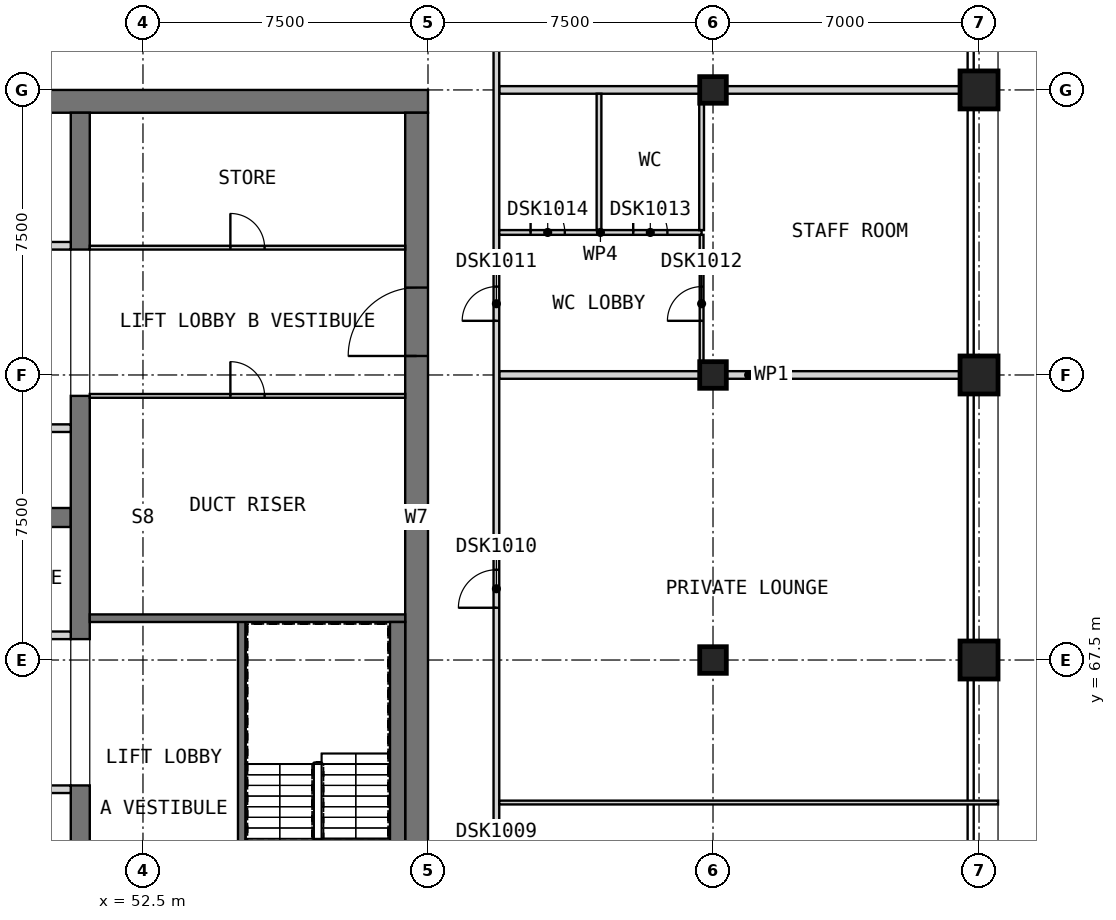
"""IFC4 building model, lengths in metres.
Left out: names, types, materials, properties, quantities, classifications, styles, units other than length and angle.
Written with IfcOpenShell. Run it as: python <this file> out.ifc"""

import sys

from ifc_helpers import new_model, si_unit, direction, frame, frame_2d, origin, origin_2d, place, context, subcontext, project, spatial, rectangle, extrude, element, fill, save


model = new_model("IFC4")
c1 = context("Model", 3, precision=1e-05, world=origin(), true_north=direction((0.0, 1.0)))
c2 = subcontext(c1, "Body", "Model", "MODEL_VIEW")
j1 = project(units=[si_unit("LENGTHUNIT", "METRE"), si_unit("PLANEANGLEUNIT", "RADIAN")], contexts=[c1])
p1 = place(None, origin())
s1 = spatial("IfcSite", under=j1, at=p1, CompositionType="ELEMENT")
p2 = place(p1, origin())
s2 = spatial("IfcBuilding", under=s1, at=p2, CompositionType="ELEMENT")
p3 = place(p2, frame((0.0, 0.0, 297.7)))
s3 = spatial("IfcBuildingStorey", under=s2, at=p3, CompositionType="ELEMENT", Elevation=297.7)
for number, where, z_axis, x_axis in (
    (1, (67.5, 67.5, 0.0), (0.0, 0.0, 1.0), (1.0, 0.0, 0.0)),
    (2, (67.5, 75.0, 0.0), (0.0, 0.0, 1.0), (1.0, 0.0, 0.0)),
    (3, (67.5, 82.5, 0.0), (0.0, 0.0, 1.0), (1.0, 0.0, 0.0)),
):
    element("IfcColumn", number, at=place(p3, frame(where, z_axis=z_axis, x_axis=x_axis)), inside=s3, PredefinedType="COLUMN", context=c2, shape_type="SweptSolid", body=[
        extrude(rectangle(XDim=0.7, YDim=0.7, at=origin_2d()), origin(), (0.0, 0.0, 1.0), 5.0),
    ])
for number, where, z_axis, x_axis in (
    (4, (74.5, 67.5, 0.0), (0.0, 0.0, 1.0), (1.0, 0.0, 0.0)),
    (5, (74.5, 75.0, 0.0), (0.0, 0.0, 1.0), (1.0, 0.0, 0.0)),
    (6, (74.5, 82.5, 0.0), (0.0, 0.0, 1.0), (1.0, 0.0, 0.0)),
):
    element("IfcColumn", number, at=place(p3, frame(where, z_axis=z_axis, x_axis=x_axis)), inside=s3, PredefinedType="COLUMN", context=c2, shape_type="SweptSolid", body=[
        extrude(rectangle(XDim=1.0, YDim=1.0, at=origin_2d()), origin(), (0.0, 0.0, 1.0), 5.0),
    ])
p4 = place(p3, frame((30.0, 82.2, 0.0), z_axis=(0.0, 0.0, 1.0), x_axis=(1.0, 0.0, 0.0)))
e7 = element("IfcWall", 7, at=p4, inside=s3, PredefinedType="SHEAR", context=c2, shape_type="SweptSolid", body=[
    extrude(rectangle(XDim=30.0, YDim=0.6, at=frame_2d((15.0, 0.0))), origin(), (0.0, 0.0, 1.0), 5.0),
])
p5 = place(p3, frame((59.7, 60.6, 0.0), z_axis=(0.0, 0.0, 1.0), x_axis=(0.0, 1.0, 0.0)))
e8 = element("IfcWall", 8, at=p5, inside=s3, PredefinedType="SHEAR", context=c2, shape_type="SweptSolid", body=[
    extrude(rectangle(XDim=21.3, YDim=0.6, at=frame_2d((10.65, 0.0))), origin(), (0.0, 0.0, 1.0), 5.0),
])
p6 = place(p5, frame((14.9, 0.0, 0.0)))
e9 = element("IfcOpeningElement", 9, at=p6, cuts=e8, PredefinedType="OPENING", context=c2, shape_type="SweptSolid", body=[
    extrude(rectangle(XDim=1.8, YDim=2.1, at=frame_2d((0.9, 1.05))), frame((0.0, 0.31, 0.0), z_axis=(0.0, -1.0, 0.0), x_axis=(1.0, 0.0, 0.0)), (0.0, 0.0, 1.0), 0.62),
])
p7 = place(p3, frame((35.0, 71.25, 0.0), z_axis=(0.0, 0.0, 1.0), x_axis=(1.0, 0.0, 0.0)))
e10 = element("IfcWall", 10, at=p7, inside=s3, PredefinedType="SHEAR", context=c2, shape_type="SweptSolid", body=[
    extrude(rectangle(XDim=15.6, YDim=0.5, at=frame_2d((7.8, 0.0))), origin(), (0.0, 0.0, 1.0), 5.0),
])
p8 = place(p3, frame((50.85, 60.6, 0.0), z_axis=(0.0, 0.0, 1.0), x_axis=(0.0, 1.0, 0.0)))
e11 = element("IfcWall", 11, at=p8, inside=s3, PredefinedType="SHEAR", context=c2, shape_type="SweptSolid", body=[
    extrude(rectangle(XDim=3.6, YDim=0.5, at=frame_2d((1.8, 0.0))), origin(), (0.0, 0.0, 1.0), 5.0),
])
p9 = place(p3, frame((50.85, 68.05, 0.0), z_axis=(0.0, 0.0, 1.0), x_axis=(0.0, 1.0, 0.0)))
e12 = element("IfcWall", 12, at=p9, inside=s3, PredefinedType="SHEAR", context=c2, shape_type="SweptSolid", body=[
    extrude(rectangle(XDim=6.4, YDim=0.5, at=frame_2d((3.2, 0.0))), origin(), (0.0, 0.0, 1.0), 5.0),
])
p10 = place(p3, frame((50.85, 78.3, 0.0), z_axis=(0.0, 0.0, 1.0), x_axis=(0.0, 1.0, 0.0)))
e13 = element("IfcWall", 13, at=p10, inside=s3, PredefinedType="SHEAR", context=c2, shape_type="SweptSolid", body=[
    extrude(rectangle(XDim=3.6, YDim=0.5, at=frame_2d((1.8, 0.0))), origin(), (0.0, 0.0, 1.0), 5.0),
])
p11 = place(p3, frame((35.0, 64.1, 0.0), z_axis=(0.0, 0.0, 1.0), x_axis=(1.0, 0.0, 0.0)))
e14 = element("IfcWall", 14, at=p11, inside=s3, PredefinedType="PARTITIONING", context=c2, shape_type="SweptSolid", body=[
    extrude(rectangle(XDim=15.6, YDim=0.2, at=frame_2d((7.8, 0.0))), origin(), (0.0, 0.0, 1.0), 4.7),
])
p12 = place(p11, frame((2.15, 0.0, 0.0)))
e15 = element("IfcOpeningElement", 15, at=p12, cuts=e14, PredefinedType="OPENING", context=c2, shape_type="SweptSolid", body=[
    extrude(rectangle(XDim=0.9, YDim=2.1, at=frame_2d((0.45, 1.05))), frame((0.0, 0.11, 0.0), z_axis=(0.0, -1.0, 0.0), x_axis=(1.0, 0.0, 0.0)), (0.0, 0.0, 1.0), 0.22),
])
p13 = place(p11, frame((9.95, 0.0, 0.0)))
e16 = element("IfcOpeningElement", 16, at=p13, cuts=e14, PredefinedType="OPENING", context=c2, shape_type="SweptSolid", body=[
    extrude(rectangle(XDim=0.9, YDim=2.1, at=frame_2d((0.45, 1.05))), frame((0.0, 0.11, 0.0), z_axis=(0.0, -1.0, 0.0), x_axis=(1.0, 0.0, 0.0)), (0.0, 0.0, 1.0), 0.22),
])
p14 = place(p3, frame((35.0, 68.15, 0.0), z_axis=(0.0, 0.0, 1.0), x_axis=(1.0, 0.0, 0.0)))
e17 = element("IfcWall", 17, at=p14, inside=s3, PredefinedType="PARTITIONING", context=c2, shape_type="SweptSolid", body=[
    extrude(rectangle(XDim=15.6, YDim=0.2, at=frame_2d((7.8, 0.0))), origin(), (0.0, 0.0, 1.0), 4.7),
])
p15 = place(p14, frame((1.5, 0.0, 0.0)))
e18 = element("IfcOpeningElement", 18, at=p15, cuts=e17, PredefinedType="OPENING", context=c2, shape_type="SweptSolid", body=[
    extrude(rectangle(XDim=0.9, YDim=2.1, at=frame_2d((0.45, 1.05))), frame((0.0, 0.11, 0.0), z_axis=(0.0, -1.0, 0.0), x_axis=(1.0, 0.0, 0.0)), (0.0, 0.0, 1.0), 0.22),
])
p16 = place(p14, frame((7.35, 0.0, 0.0)))
e19 = element("IfcOpeningElement", 19, at=p16, cuts=e17, PredefinedType="OPENING", context=c2, shape_type="SweptSolid", body=[
    extrude(rectangle(XDim=0.9, YDim=2.1, at=frame_2d((0.45, 1.05))), frame((0.0, 0.11, 0.0), z_axis=(0.0, -1.0, 0.0), x_axis=(1.0, 0.0, 0.0)), (0.0, 0.0, 1.0), 0.22),
])
p17 = place(p14, frame((13.2, 0.0, 0.0)))
e20 = element("IfcOpeningElement", 20, at=p17, cuts=e17, PredefinedType="OPENING", context=c2, shape_type="SweptSolid", body=[
    extrude(rectangle(XDim=0.9, YDim=2.1, at=frame_2d((0.45, 1.05))), frame((0.0, 0.11, 0.0), z_axis=(0.0, -1.0, 0.0), x_axis=(1.0, 0.0, 0.0)), (0.0, 0.0, 1.0), 0.22),
])
p18 = place(p3, frame((35.0, 73.6, 0.0), z_axis=(0.0, 0.0, 1.0), x_axis=(1.0, 0.0, 0.0)))
e21 = element("IfcWall", 21, at=p18, inside=s3, PredefinedType="SOLIDWALL", context=c2, shape_type="SweptSolid", body=[
    extrude(rectangle(XDim=15.6, YDim=0.2, at=frame_2d((7.8, 0.0))), origin(), (0.0, 0.0, 1.0), 5.0),
])
p19 = place(p18, frame((0.75, 0.0, 0.0)))
e22 = element("IfcOpeningElement", 22, at=p19, cuts=e21, PredefinedType="OPENING", context=c2, shape_type="SweptSolid", body=[
    extrude(rectangle(XDim=1.1, YDim=2.1, at=frame_2d((0.55, 1.05))), frame((0.0, 0.11, 0.0), z_axis=(0.0, -1.0, 0.0), x_axis=(1.0, 0.0, 0.0)), (0.0, 0.0, 1.0), 0.22),
])
p20 = place(p18, frame((3.35, 0.0, 0.0)))
e23 = element("IfcOpeningElement", 23, at=p20, cuts=e21, PredefinedType="OPENING", context=c2, shape_type="SweptSolid", body=[
    extrude(rectangle(XDim=1.1, YDim=2.1, at=frame_2d((0.55, 1.05))), frame((0.0, 0.11, 0.0), z_axis=(0.0, -1.0, 0.0), x_axis=(1.0, 0.0, 0.0)), (0.0, 0.0, 1.0), 0.22),
])
p21 = place(p18, frame((5.95, 0.0, 0.0)))
e24 = element("IfcOpeningElement", 24, at=p21, cuts=e21, PredefinedType="OPENING", context=c2, shape_type="SweptSolid", body=[
    extrude(rectangle(XDim=1.1, YDim=2.1, at=frame_2d((0.55, 1.05))), frame((0.0, 0.11, 0.0), z_axis=(0.0, -1.0, 0.0), x_axis=(1.0, 0.0, 0.0)), (0.0, 0.0, 1.0), 0.22),
])
p22 = place(p18, frame((8.55, 0.0, 0.0)))
e25 = element("IfcOpeningElement", 25, at=p22, cuts=e21, PredefinedType="OPENING", context=c2, shape_type="SweptSolid", body=[
    extrude(rectangle(XDim=1.1, YDim=2.1, at=frame_2d((0.55, 1.05))), frame((0.0, 0.11, 0.0), z_axis=(0.0, -1.0, 0.0), x_axis=(1.0, 0.0, 0.0)), (0.0, 0.0, 1.0), 0.22),
])
p23 = place(p18, frame((11.15, 0.0, 0.0)))
e26 = element("IfcOpeningElement", 26, at=p23, cuts=e21, PredefinedType="OPENING", context=c2, shape_type="SweptSolid", body=[
    extrude(rectangle(XDim=1.1, YDim=2.1, at=frame_2d((0.55, 1.05))), frame((0.0, 0.11, 0.0), z_axis=(0.0, -1.0, 0.0), x_axis=(1.0, 0.0, 0.0)), (0.0, 0.0, 1.0), 0.22),
])
p24 = place(p18, frame((13.75, 0.0, 0.0)))
e27 = element("IfcOpeningElement", 27, at=p24, cuts=e21, PredefinedType="OPENING", context=c2, shape_type="SweptSolid", body=[
    extrude(rectangle(XDim=1.1, YDim=2.1, at=frame_2d((0.55, 1.05))), frame((0.0, 0.11, 0.0), z_axis=(0.0, -1.0, 0.0), x_axis=(1.0, 0.0, 0.0)), (0.0, 0.0, 1.0), 0.22),
])
p25 = place(p3, frame((35.0, 78.4, 0.0), z_axis=(0.0, 0.0, 1.0), x_axis=(1.0, 0.0, 0.0)))
e28 = element("IfcWall", 28, at=p25, inside=s3, PredefinedType="SOLIDWALL", context=c2, shape_type="SweptSolid", body=[
    extrude(rectangle(XDim=15.6, YDim=0.2, at=frame_2d((7.8, 0.0))), origin(), (0.0, 0.0, 1.0), 5.0),
])
p26 = place(p25, frame((0.75, 0.0, 0.0)))
e29 = element("IfcOpeningElement", 29, at=p26, cuts=e28, PredefinedType="OPENING", context=c2, shape_type="SweptSolid", body=[
    extrude(rectangle(XDim=1.1, YDim=2.1, at=frame_2d((0.55, 1.05))), frame((0.0, 0.11, 0.0), z_axis=(0.0, -1.0, 0.0), x_axis=(1.0, 0.0, 0.0)), (0.0, 0.0, 1.0), 0.22),
])
p27 = place(p25, frame((3.35, 0.0, 0.0)))
e30 = element("IfcOpeningElement", 30, at=p27, cuts=e28, PredefinedType="OPENING", context=c2, shape_type="SweptSolid", body=[
    extrude(rectangle(XDim=1.1, YDim=2.1, at=frame_2d((0.55, 1.05))), frame((0.0, 0.11, 0.0), z_axis=(0.0, -1.0, 0.0), x_axis=(1.0, 0.0, 0.0)), (0.0, 0.0, 1.0), 0.22),
])
p28 = place(p25, frame((11.15, 0.0, 0.0)))
e31 = element("IfcOpeningElement", 31, at=p28, cuts=e28, PredefinedType="OPENING", context=c2, shape_type="SweptSolid", body=[
    extrude(rectangle(XDim=1.1, YDim=2.1, at=frame_2d((0.55, 1.05))), frame((0.0, 0.11, 0.0), z_axis=(0.0, -1.0, 0.0), x_axis=(1.0, 0.0, 0.0)), (0.0, 0.0, 1.0), 0.22),
])
p29 = place(p25, frame((13.75, 0.0, 0.0)))
e32 = element("IfcOpeningElement", 32, at=p29, cuts=e28, PredefinedType="OPENING", context=c2, shape_type="SweptSolid", body=[
    extrude(rectangle(XDim=1.1, YDim=2.1, at=frame_2d((0.55, 1.05))), frame((0.0, 0.11, 0.0), z_axis=(0.0, -1.0, 0.0), x_axis=(1.0, 0.0, 0.0)), (0.0, 0.0, 1.0), 0.22),
])
p30 = place(p3, frame((55.1, 60.6, 0.0), z_axis=(0.0, 0.0, 1.0), x_axis=(0.0, 1.0, 0.0)))
e33 = element("IfcWall", 33, at=p30, inside=s3, PredefinedType="SOLIDWALL", context=c2, shape_type="SweptSolid", body=[
    extrude(rectangle(XDim=8.0, YDim=0.2, at=frame_2d((4.0, 0.0))), origin(), (0.0, 0.0, 1.0), 4.7),
])
p31 = place(p3, frame((51.1, 68.6, 0.0), z_axis=(0.0, 0.0, 1.0), x_axis=(1.0, 0.0, 0.0)))
e34 = element("IfcWall", 34, at=p31, inside=s3, PredefinedType="SOLIDWALL", context=c2, shape_type="SweptSolid", body=[
    extrude(rectangle(XDim=8.3, YDim=0.2, at=frame_2d((4.15, 0.0))), origin(), (0.0, 0.0, 1.0), 4.7),
])
p32 = place(p3, frame((59.2, 60.6, 0.0), z_axis=(0.0, 0.0, 1.0), x_axis=(0.0, 1.0, 0.0)))
e35 = element("IfcWall", 35, at=p32, inside=s3, PredefinedType="SOLIDWALL", context=c2, shape_type="SweptSolid", body=[
    extrude(rectangle(XDim=7.9, YDim=0.4, at=frame_2d((3.95, 0.0))), origin(), (0.0, 0.0, 1.0), 4.7),
])
p33 = place(p3, frame((51.1, 74.45, 0.0), z_axis=(0.0, 0.0, 1.0), x_axis=(1.0, 0.0, 0.0)))
e36 = element("IfcWall", 36, at=p33, inside=s3, PredefinedType="PARTITIONING", context=c2, shape_type="SweptSolid", body=[
    extrude(rectangle(XDim=8.3, YDim=0.1, at=frame_2d((4.15, 0.0))), origin(), (0.0, 0.0, 1.0), 4.7),
])
p34 = place(p33, frame((3.7, 0.0, 0.0)))
e37 = element("IfcOpeningElement", 37, at=p34, cuts=e36, PredefinedType="OPENING", context=c2, shape_type="SweptSolid", body=[
    extrude(rectangle(XDim=0.9, YDim=2.1, at=frame_2d((0.45, 1.05))), frame((0.0, 0.06, 0.0), z_axis=(0.0, -1.0, 0.0), x_axis=(1.0, 0.0, 0.0)), (0.0, 0.0, 1.0), 0.12),
])
p35 = place(p3, frame((51.1, 78.35, 0.0), z_axis=(0.0, 0.0, 1.0), x_axis=(1.0, 0.0, 0.0)))
e38 = element("IfcWall", 38, at=p35, inside=s3, PredefinedType="PARTITIONING", context=c2, shape_type="SweptSolid", body=[
    extrude(rectangle(XDim=8.3, YDim=0.1, at=frame_2d((4.15, 0.0))), origin(), (0.0, 0.0, 1.0), 4.7),
])
p36 = place(p35, frame((3.7, 0.0, 0.0)))
e39 = element("IfcOpeningElement", 39, at=p36, cuts=e38, PredefinedType="OPENING", context=c2, shape_type="SweptSolid", body=[
    extrude(rectangle(XDim=0.9, YDim=2.1, at=frame_2d((0.45, 1.05))), frame((0.0, 0.06, 0.0), z_axis=(0.0, -1.0, 0.0), x_axis=(1.0, 0.0, 0.0)), (0.0, 0.0, 1.0), 0.12),
])
for number, where, z_axis, x_axis in (
    (40, (61.875, 75.0, 0.0), (0.0, 0.0, 1.0), (1.0, 0.0, 0.0)),
    (41, (61.875, 82.5, 0.0), (0.0, 0.0, 1.0), (1.0, 0.0, 0.0)),
):
    element("IfcWall", number, at=place(p3, frame(where, z_axis=z_axis, x_axis=x_axis)), inside=s3, PredefinedType="PARTITIONING", context=c2, shape_type="SweptSolid", body=[
        extrude(rectangle(XDim=13.125, YDim=0.2, at=frame_2d((6.562, 0.0))), origin(), (0.0, 0.0, 1.0), 4.7),
    ])
p37 = place(p3, frame((61.8, 58.275, 0.0), z_axis=(0.0, 0.0, 1.0), x_axis=(0.0, 1.0, 0.0)))
e42 = element("IfcWall", 42, at=p37, inside=s3, PredefinedType="PARTITIONING", context=c2, shape_type="SweptSolid", body=[
    extrude(rectangle(XDim=25.95, YDim=0.15, at=frame_2d((12.975, 0.0))), origin(), (0.0, 0.0, 1.0), 4.7),
])
p38 = place(p37, frame((3.1, 0.0, 0.0)))
e43 = element("IfcOpeningElement", 43, at=p38, cuts=e42, PredefinedType="OPENING", context=c2, shape_type="SweptSolid", body=[
    extrude(rectangle(XDim=1.0, YDim=2.1, at=frame_2d((0.5, 1.05))), frame((0.0, 0.085, 0.0), z_axis=(0.0, -1.0, 0.0), x_axis=(1.0, 0.0, 0.0)), (0.0, 0.0, 1.0), 0.17),
])
p39 = place(p37, frame((10.6, 0.0, 0.0)))
e44 = element("IfcOpeningElement", 44, at=p39, cuts=e42, PredefinedType="OPENING", context=c2, shape_type="SweptSolid", body=[
    extrude(rectangle(XDim=1.0, YDim=2.1, at=frame_2d((0.5, 1.05))), frame((0.0, 0.085, 0.0), z_axis=(0.0, -1.0, 0.0), x_axis=(1.0, 0.0, 0.0)), (0.0, 0.0, 1.0), 0.17),
])
p40 = place(p37, frame((18.15, 0.0, 0.0)))
e45 = element("IfcOpeningElement", 45, at=p40, cuts=e42, PredefinedType="OPENING", context=c2, shape_type="SweptSolid", body=[
    extrude(rectangle(XDim=0.9, YDim=2.1, at=frame_2d((0.45, 1.05))), frame((0.0, 0.085, 0.0), z_axis=(0.0, -1.0, 0.0), x_axis=(1.0, 0.0, 0.0)), (0.0, 0.0, 1.0), 0.17),
])
p41 = place(p3, frame((61.875, 63.75, 0.0), z_axis=(0.0, 0.0, 1.0), x_axis=(1.0, 0.0, 0.0)))
e46 = element("IfcWall", 46, at=p41, inside=s3, PredefinedType="PARTITIONING", context=c2, shape_type="SweptSolid", body=[
    extrude(rectangle(XDim=13.125, YDim=0.1, at=frame_2d((6.562, 0.0))), origin(), (0.0, 0.0, 1.0), 4.7),
])
p42 = place(p3, frame((67.2, 75.1, 0.0), z_axis=(0.0, 0.0, 1.0), x_axis=(0.0, 1.0, 0.0)))
e47 = element("IfcWall", 47, at=p42, inside=s3, PredefinedType="PARTITIONING", context=c2, shape_type="SweptSolid", body=[
    extrude(rectangle(XDim=3.587, YDim=0.1, at=frame_2d((1.794, 0.0))), origin(), (0.0, 0.0, 1.0), 4.7),
])
p43 = place(p42, frame((1.325, 0.0, 0.0)))
e48 = element("IfcOpeningElement", 48, at=p43, cuts=e47, PredefinedType="OPENING", context=c2, shape_type="SweptSolid", body=[
    extrude(rectangle(XDim=0.9, YDim=2.1, at=frame_2d((0.45, 1.05))), frame((0.0, 0.06, 0.0), z_axis=(0.0, -1.0, 0.0), x_axis=(1.0, 0.0, 0.0)), (0.0, 0.0, 1.0), 0.12),
])
p44 = place(p3, frame((61.875, 78.75, 0.0), z_axis=(0.0, 0.0, 1.0), x_axis=(1.0, 0.0, 0.0)))
e49 = element("IfcWall", 49, at=p44, inside=s3, PredefinedType="PARTITIONING", context=c2, shape_type="SweptSolid", body=[
    extrude(rectangle(XDim=5.325, YDim=0.125, at=frame_2d((2.663, 0.0))), origin(), (0.0, 0.0, 1.0), 4.7),
])
p45 = place(p44, frame((3.525, 0.0, 0.0)))
e50 = element("IfcOpeningElement", 50, at=p45, cuts=e49, PredefinedType="OPENING", context=c2, shape_type="SweptSolid", body=[
    extrude(rectangle(XDim=0.9, YDim=2.1, at=frame_2d((0.45, 1.05))), frame((0.0, 0.073, 0.0), z_axis=(0.0, -1.0, 0.0), x_axis=(1.0, 0.0, 0.0)), (0.0, 0.0, 1.0), 0.145),
])
p46 = place(p44, frame((0.825, 0.0, 0.0)))
e51 = element("IfcOpeningElement", 51, at=p46, cuts=e49, PredefinedType="OPENING", context=c2, shape_type="SweptSolid", body=[
    extrude(rectangle(XDim=0.9, YDim=2.1, at=frame_2d((0.45, 1.05))), frame((0.0, 0.073, 0.0), z_axis=(0.0, -1.0, 0.0), x_axis=(1.0, 0.0, 0.0)), (0.0, 0.0, 1.0), 0.145),
])
for number, where, z_axis, x_axis in (
    (52, (64.5, 78.812, 0.0), (0.0, 0.0, 1.0), (0.0, 1.0, 0.0)),
    (53, (67.2, 78.812, 0.0), (0.0, 0.0, 1.0), (0.0, 1.0, 0.0)),
):
    element("IfcWall", number, at=place(p3, frame(where, z_axis=z_axis, x_axis=x_axis)), inside=s3, PredefinedType="PARTITIONING", context=c2, shape_type="SweptSolid", body=[
        extrude(rectangle(XDim=3.587, YDim=0.125, at=frame_2d((1.794, 0.0))), origin(), (0.0, 0.0, 1.0), 4.7),
    ])
p47 = place(p6, origin())
e54 = element("IfcDoor", 54, at=p47, inside=s3, OperationType="DOUBLE_DOOR_SINGLE_SWING", PredefinedType="DOOR", context=c2, shape_type="SweptSolid", body=[
    extrude(rectangle(XDim=1.8, YDim=2.1, at=frame_2d((0.9, 1.05))), frame((0.0, 0.025, 0.0), z_axis=(0.0, -1.0, 0.0), x_axis=(1.0, 0.0, 0.0)), (0.0, 0.0, 1.0), 0.05),
])
fill(e9, e54)
p48 = place(p34, origin())
e55 = element("IfcDoor", 55, at=p48, inside=s3, OperationType="SINGLE_SWING_RIGHT", PredefinedType="DOOR", context=c2, shape_type="SweptSolid", body=[
    extrude(rectangle(XDim=0.9, YDim=2.1, at=frame_2d((0.45, 1.05))), frame((0.0, 0.025, 0.0), z_axis=(0.0, -1.0, 0.0), x_axis=(1.0, 0.0, 0.0)), (0.0, 0.0, 1.0), 0.05),
])
fill(e37, e55)
p49 = place(p36, origin())
e56 = element("IfcDoor", 56, at=p49, inside=s3, OperationType="SINGLE_SWING_RIGHT", PredefinedType="DOOR", context=c2, shape_type="SweptSolid", body=[
    extrude(rectangle(XDim=0.9, YDim=2.1, at=frame_2d((0.45, 1.05))), frame((0.0, 0.025, 0.0), z_axis=(0.0, -1.0, 0.0), x_axis=(1.0, 0.0, 0.0)), (0.0, 0.0, 1.0), 0.05),
])
fill(e39, e56)
p50 = place(p39, origin())
e57 = element("IfcDoor", 57, at=p50, inside=s3, OperationType="SINGLE_SWING_RIGHT", PredefinedType="DOOR", context=c2, shape_type="SweptSolid", body=[
    extrude(rectangle(XDim=1.0, YDim=2.1, at=frame_2d((0.5, 1.05))), frame((0.0, 0.025, 0.0), z_axis=(0.0, -1.0, 0.0), x_axis=(1.0, 0.0, 0.0)), (0.0, 0.0, 1.0), 0.05),
])
fill(e44, e57)
p51 = place(p40, origin())
e58 = element("IfcDoor", 58, at=p51, inside=s3, OperationType="SINGLE_SWING_RIGHT", PredefinedType="DOOR", context=c2, shape_type="SweptSolid", body=[
    extrude(rectangle(XDim=0.9, YDim=2.1, at=frame_2d((0.45, 1.05))), frame((0.0, 0.025, 0.0), z_axis=(0.0, -1.0, 0.0), x_axis=(1.0, 0.0, 0.0)), (0.0, 0.0, 1.0), 0.05),
])
fill(e45, e58)
p52 = place(p43, origin())
e59 = element("IfcDoor", 59, at=p52, inside=s3, OperationType="SINGLE_SWING_LEFT", PredefinedType="DOOR", context=c2, shape_type="SweptSolid", body=[
    extrude(rectangle(XDim=0.9, YDim=2.1, at=frame_2d((0.45, 1.05))), frame((0.0, 0.025, 0.0), z_axis=(0.0, -1.0, 0.0), x_axis=(1.0, 0.0, 0.0)), (0.0, 0.0, 1.0), 0.05),
])
fill(e48, e59)
p53 = place(p45, origin())
e60 = element("IfcDoor", 60, at=p53, inside=s3, OperationType="SINGLE_SWING_LEFT", PredefinedType="DOOR", context=c2, shape_type="SweptSolid", body=[
    extrude(rectangle(XDim=0.9, YDim=2.1, at=frame_2d((0.45, 1.05))), frame((0.0, 0.025, 0.0), z_axis=(0.0, -1.0, 0.0), x_axis=(1.0, 0.0, 0.0)), (0.0, 0.0, 1.0), 0.05),
])
fill(e50, e60)
p54 = place(p46, origin())
e61 = element("IfcDoor", 61, at=p54, inside=s3, OperationType="SINGLE_SWING_LEFT", PredefinedType="DOOR", context=c2, shape_type="SweptSolid", body=[
    extrude(rectangle(XDim=0.9, YDim=2.1, at=frame_2d((0.45, 1.05))), frame((0.0, 0.025, 0.0), z_axis=(0.0, -1.0, 0.0), x_axis=(1.0, 0.0, 0.0)), (0.0, 0.0, 1.0), 0.05),
])
fill(e51, e61)
save(model, sys.argv[1])
